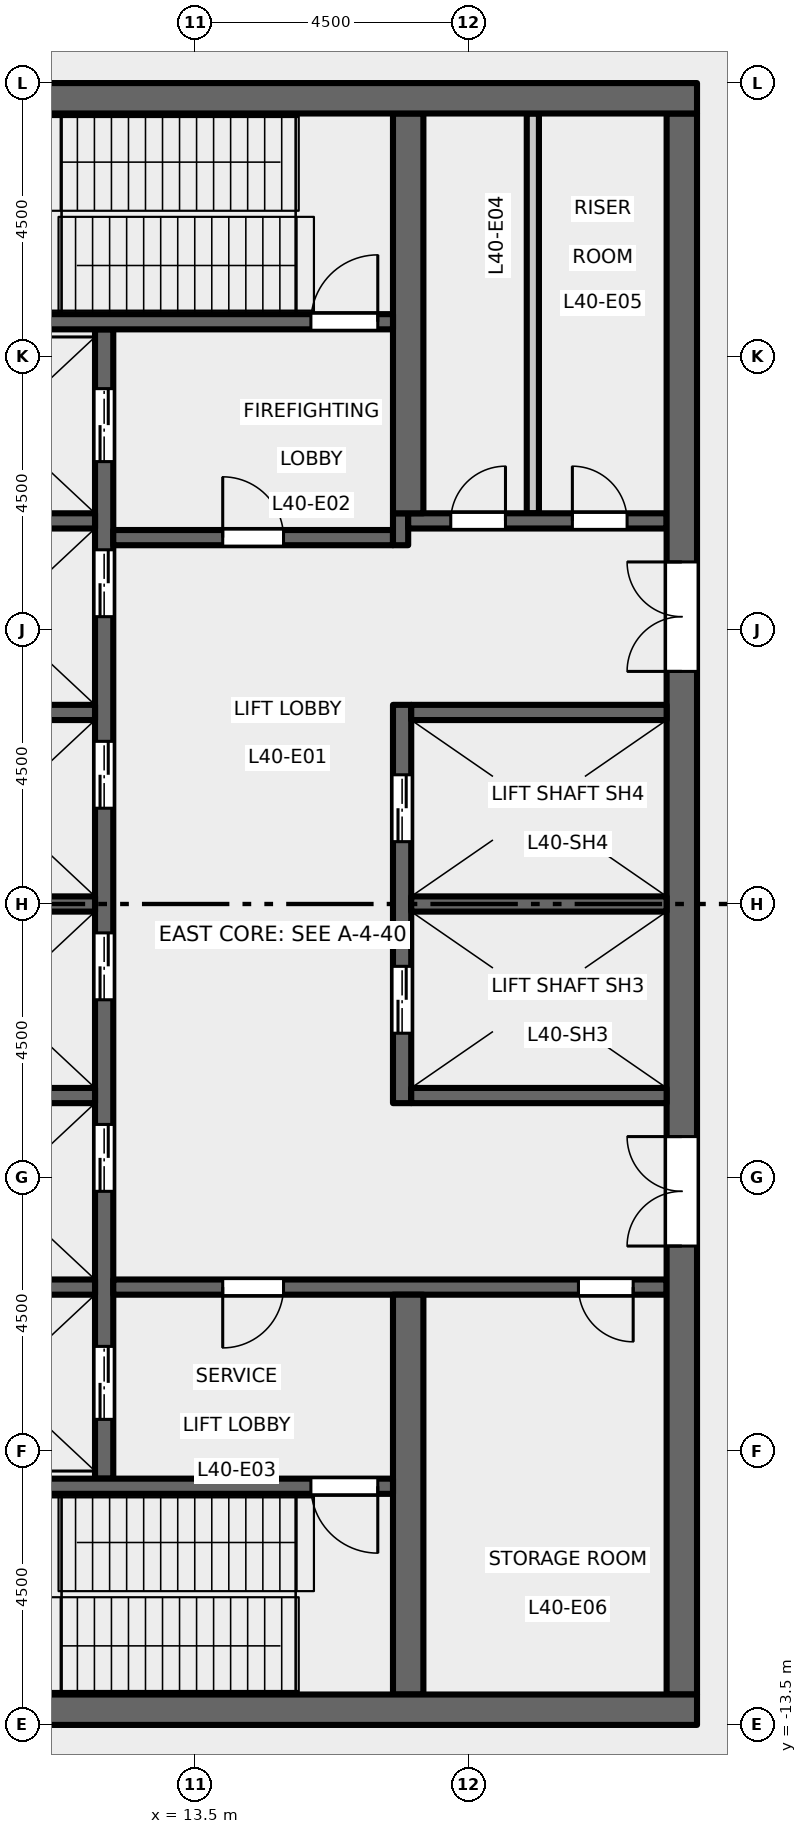
"""IFC4 building model, lengths in metres.
Left out: names, types, materials, properties, quantities, classifications, styles, units other than length and angle.
Written with IfcOpenShell. Run it as: python <this file> out.ifc"""

import sys

from ifc_helpers import new_model, si_unit, direction, frame, frame_2d, origin, place, context, subcontext, project, spatial, rectangle, extrude, element, fill, save


model = new_model("IFC4")
c1 = context("Model", 3, precision=1e-05, world=origin(), true_north=direction((0.0, 1.0)))
c2 = subcontext(c1, "Body", "Model", "MODEL_VIEW")
j1 = project(units=[si_unit("LENGTHUNIT", "METRE"), si_unit("PLANEANGLEUNIT", "RADIAN")], contexts=[c1])
p1 = place(None, origin())
s1 = spatial("IfcSite", under=j1, at=p1, CompositionType="ELEMENT")
p2 = place(p1, origin())
s2 = spatial("IfcBuilding", under=s1, at=p2, CompositionType="ELEMENT")
p3 = place(p2, frame((0.0, 0.0, 187.2)))
s3 = spatial("IfcBuildingStorey", under=s2, at=p3, CompositionType="ELEMENT", Elevation=187.2)
p4 = place(p3, frame((12.0, -9.45, 0.0), z_axis=(0.0, 0.0, 1.0), x_axis=(0.0, 1.0, 0.0)))
e1 = element("IfcWall", 1, at=p4, inside=s3, PredefinedType="SHEAR", context=c2, shape_type="SweptSolid", body=[
    extrude(rectangle(XDim=18.9, YDim=0.3, at=frame_2d((9.45, 0.0))), origin(), (0.0, 0.0, 1.0), 5.35),
])
p5 = place(p4, frame((4.725, 0.0, 0.0)))
e2 = element("IfcOpeningElement", 2, at=p5, cuts=e1, PredefinedType="OPENING", context=c2, shape_type="SweptSolid", body=[
    extrude(rectangle(XDim=1.1, YDim=2.1, at=frame_2d((0.55, 1.05))), frame((0.0, 0.16, 0.0), z_axis=(0.0, -1.0, 0.0), x_axis=(1.0, 0.0, 0.0)), (0.0, 0.0, 1.0), 0.32),
])
p6 = place(p4, frame((7.875, 0.0, 0.0)))
e3 = element("IfcOpeningElement", 3, at=p6, cuts=e1, PredefinedType="OPENING", context=c2, shape_type="SweptSolid", body=[
    extrude(rectangle(XDim=1.1, YDim=2.1, at=frame_2d((0.55, 1.05))), frame((0.0, 0.16, 0.0), z_axis=(0.0, -1.0, 0.0), x_axis=(1.0, 0.0, 0.0)), (0.0, 0.0, 1.0), 0.32),
])
p7 = place(p4, frame((11.025, 0.0, 0.0)))
e4 = element("IfcOpeningElement", 4, at=p7, cuts=e1, PredefinedType="OPENING", context=c2, shape_type="SweptSolid", body=[
    extrude(rectangle(XDim=1.1, YDim=2.1, at=frame_2d((0.55, 1.05))), frame((0.0, 0.16, 0.0), z_axis=(0.0, -1.0, 0.0), x_axis=(1.0, 0.0, 0.0)), (0.0, 0.0, 1.0), 0.32),
])
p8 = place(p4, frame((14.175, 0.0, 0.0)))
e5 = element("IfcOpeningElement", 5, at=p8, cuts=e1, PredefinedType="OPENING", context=c2, shape_type="SweptSolid", body=[
    extrude(rectangle(XDim=1.1, YDim=2.1, at=frame_2d((0.55, 1.05))), frame((0.0, 0.16, 0.0), z_axis=(0.0, -1.0, 0.0), x_axis=(1.0, 0.0, 0.0)), (0.0, 0.0, 1.0), 0.32),
])
p9 = place(p4, frame((16.725, 0.0, 0.0)))
e6 = element("IfcOpeningElement", 6, at=p9, cuts=e1, PredefinedType="OPENING", context=c2, shape_type="SweptSolid", body=[
    extrude(rectangle(XDim=1.2, YDim=2.1, at=frame_2d((0.6, 1.05))), frame((0.0, 0.16, 0.0), z_axis=(0.0, -1.0, 0.0), x_axis=(1.0, 0.0, 0.0)), (0.0, 0.0, 1.0), 0.32),
])
p10 = place(p4, frame((0.975, 0.0, 0.0)))
e7 = element("IfcOpeningElement", 7, at=p10, cuts=e1, PredefinedType="OPENING", context=c2, shape_type="SweptSolid", body=[
    extrude(rectangle(XDim=1.2, YDim=2.1, at=frame_2d((0.6, 1.05))), frame((0.0, 0.16, 0.0), z_axis=(0.0, -1.0, 0.0), x_axis=(1.0, 0.0, 0.0)), (0.0, 0.0, 1.0), 0.32),
])
p11 = place(p3, frame((12.15, 6.025, 0.0), z_axis=(0.0, 0.0, 1.0), x_axis=(1.0, 0.0, 0.0)))
e8 = element("IfcWall", 8, at=p11, inside=s3, PredefinedType="SHEAR", context=c2, shape_type="SweptSolid", body=[
    extrude(rectangle(XDim=4.6, YDim=0.25, at=frame_2d((2.3, 0.0))), origin(), (0.0, 0.0, 1.0), 5.35),
])
p12 = place(p11, frame((1.8, 0.0, 0.0)))
e9 = element("IfcOpeningElement", 9, at=p12, cuts=e8, PredefinedType="OPENING", context=c2, shape_type="SweptSolid", body=[
    extrude(rectangle(XDim=1.0, YDim=2.1, at=frame_2d((0.5, 1.05))), frame((0.0, 0.135, 0.0), z_axis=(0.0, -1.0, 0.0), x_axis=(1.0, 0.0, 0.0)), (0.0, 0.0, 1.0), 0.27),
])
p13 = place(p3, frame((16.875, 5.9, 0.0), z_axis=(0.0, 0.0, 1.0), x_axis=(0.0, 1.0, 0.0)))
e10 = element("IfcWall", 10, at=p13, inside=s3, PredefinedType="SHEAR", context=c2, shape_type="SweptSolid", body=[
    extrude(rectangle(XDim=0.525, YDim=0.25, at=frame_2d((0.263, 0.0))), origin(), (0.0, 0.0, 1.0), 5.35),
])
p14 = place(p3, frame((17.0, 6.3, 0.0), z_axis=(0.0, 0.0, 1.0), x_axis=(1.0, 0.0, 0.0)))
e11 = element("IfcWall", 11, at=p14, inside=s3, PredefinedType="SHEAR", context=c2, shape_type="SweptSolid", body=[
    extrude(rectangle(XDim=4.25, YDim=0.25, at=frame_2d((2.125, 0.0))), origin(), (0.0, 0.0, 1.0), 5.35),
])
p15 = place(p14, frame((0.7, 0.0, 0.0)))
e12 = element("IfcOpeningElement", 12, at=p15, cuts=e11, PredefinedType="OPENING", context=c2, shape_type="SweptSolid", body=[
    extrude(rectangle(XDim=0.9, YDim=2.1, at=frame_2d((0.45, 1.05))), frame((0.0, 0.135, 0.0), z_axis=(0.0, -1.0, 0.0), x_axis=(1.0, 0.0, 0.0)), (0.0, 0.0, 1.0), 0.27),
])
p16 = place(p14, frame((2.7, 0.0, 0.0)))
e13 = element("IfcOpeningElement", 13, at=p16, cuts=e11, PredefinedType="OPENING", context=c2, shape_type="SweptSolid", body=[
    extrude(rectangle(XDim=0.9, YDim=2.1, at=frame_2d((0.45, 1.05))), frame((0.0, 0.135, 0.0), z_axis=(0.0, -1.0, 0.0), x_axis=(1.0, 0.0, 0.0)), (0.0, 0.0, 1.0), 0.27),
])
p17 = place(p3, frame((12.15, -6.3, 0.0), z_axis=(0.0, 0.0, 1.0), x_axis=(1.0, 0.0, 0.0)))
e14 = element("IfcWall", 14, at=p17, inside=s3, PredefinedType="SHEAR", context=c2, shape_type="SweptSolid", body=[
    extrude(rectangle(XDim=9.1, YDim=0.25, at=frame_2d((4.55, 0.0))), origin(), (0.0, 0.0, 1.0), 5.35),
])
p18 = place(p17, frame((1.8, 0.0, 0.0)))
e15 = element("IfcOpeningElement", 15, at=p18, cuts=e14, PredefinedType="OPENING", context=c2, shape_type="SweptSolid", body=[
    extrude(rectangle(XDim=1.0, YDim=2.1, at=frame_2d((0.5, 1.05))), frame((0.0, 0.135, 0.0), z_axis=(0.0, -1.0, 0.0), x_axis=(1.0, 0.0, 0.0)), (0.0, 0.0, 1.0), 0.27),
])
p19 = place(p17, frame((7.65, 0.0, 0.0)))
e16 = element("IfcOpeningElement", 16, at=p19, cuts=e14, PredefinedType="OPENING", context=c2, shape_type="SweptSolid", body=[
    extrude(rectangle(XDim=0.9, YDim=2.1, at=frame_2d((0.45, 1.05))), frame((0.0, 0.135, 0.0), z_axis=(0.0, -1.0, 0.0), x_axis=(1.0, 0.0, 0.0)), (0.0, 0.0, 1.0), 0.27),
])
p20 = place(p3, frame((21.5, -13.0, 0.0), z_axis=(0.0, 0.0, 1.0), x_axis=(0.0, 1.0, 0.0)))
e17 = element("IfcWall", 17, at=p20, inside=s3, PredefinedType="SHEAR", context=c2, shape_type="SweptSolid", body=[
    extrude(rectangle(XDim=26.0, YDim=0.5, at=frame_2d((13.0, 0.0))), origin(), (0.0, 0.0, 1.0), 5.35),
])
p21 = place(p20, frame((16.825, 0.0, 0.0)))
e18 = element("IfcOpeningElement", 18, at=p21, cuts=e17, PredefinedType="OPENING", context=c2, shape_type="SweptSolid", body=[
    extrude(rectangle(XDim=1.8, YDim=2.1, at=frame_2d((0.9, 1.05))), frame((0.0, 0.26, 0.0), z_axis=(0.0, -1.0, 0.0), x_axis=(1.0, 0.0, 0.0)), (0.0, 0.0, 1.0), 0.52),
])
p22 = place(p20, frame((7.375, 0.0, 0.0)))
e19 = element("IfcOpeningElement", 19, at=p22, cuts=e17, PredefinedType="OPENING", context=c2, shape_type="SweptSolid", body=[
    extrude(rectangle(XDim=1.8, YDim=2.1, at=frame_2d((0.9, 1.05))), frame((0.0, 0.26, 0.0), z_axis=(0.0, -1.0, 0.0), x_axis=(1.0, 0.0, 0.0)), (0.0, 0.0, 1.0), 0.52),
])
p23 = place(p3, frame((19.05, 6.425, 0.0), z_axis=(0.0, 0.0, 1.0), x_axis=(0.0, 1.0, 0.0)))
e20 = element("IfcWall", 20, at=p23, inside=s3, PredefinedType="PARTITIONING", context=c2, shape_type="SweptSolid", body=[
    extrude(rectangle(XDim=6.575, YDim=0.2, at=frame_2d((3.288, 0.0))), origin(), (0.0, 0.0, 1.0), 5.35),
])
p24 = place(p3, frame((16.9, -3.275, 0.0), z_axis=(0.0, 0.0, 1.0), x_axis=(0.0, 1.0, 0.0)))
e21 = element("IfcWall", 21, at=p24, inside=s3, PredefinedType="SHEAR", context=c2, shape_type="SweptSolid", body=[
    extrude(rectangle(XDim=6.55, YDim=0.3, at=frame_2d((3.275, 0.0))), origin(), (0.0, 0.0, 1.0), 5.35),
])
p25 = place(p24, frame((1.15, 0.0, 0.0)))
e22 = element("IfcOpeningElement", 22, at=p25, cuts=e21, PredefinedType="OPENING", context=c2, shape_type="SweptSolid", body=[
    extrude(rectangle(XDim=1.1, YDim=2.1, at=frame_2d((0.55, 1.05))), frame((0.0, 0.16, 0.0), z_axis=(0.0, -1.0, 0.0), x_axis=(1.0, 0.0, 0.0)), (0.0, 0.0, 1.0), 0.32),
])
p26 = place(p24, frame((4.3, 0.0, 0.0)))
e23 = element("IfcOpeningElement", 23, at=p26, cuts=e21, PredefinedType="OPENING", context=c2, shape_type="SweptSolid", body=[
    extrude(rectangle(XDim=1.1, YDim=2.1, at=frame_2d((0.55, 1.05))), frame((0.0, 0.16, 0.0), z_axis=(0.0, -1.0, 0.0), x_axis=(1.0, 0.0, 0.0)), (0.0, 0.0, 1.0), 0.32),
])
for number, where, z_axis, x_axis in (
    (24, (17.05, 0.0, 0.0), (0.0, 0.0, 1.0), (1.0, 0.0, 0.0)),
    (25, (17.05, 3.15, 0.0), (0.0, 0.0, 1.0), (1.0, 0.0, 0.0)),
    (26, (17.05, -3.15, 0.0), (0.0, 0.0, 1.0), (1.0, 0.0, 0.0)),
):
    element("IfcWall", number, at=place(p3, frame(where, z_axis=z_axis, x_axis=x_axis)), inside=s3, PredefinedType="SHEAR", context=c2, shape_type="SweptSolid", body=[
        extrude(rectangle(XDim=4.2, YDim=0.25, at=frame_2d((2.1, 0.0))), origin(), (0.0, 0.0, 1.0), 5.35),
    ])
for number, where, z_axis, x_axis in (
    (27, (17.0, 6.425, 0.0), (0.0, 0.0, 1.0), (0.0, 1.0, 0.0)),
    (28, (17.0, -13.0, 0.0), (0.0, 0.0, 1.0), (0.0, 1.0, 0.0)),
):
    element("IfcWall", number, at=place(p3, frame(where, z_axis=z_axis, x_axis=x_axis)), inside=s3, PredefinedType="SHEAR", context=c2, shape_type="SweptSolid", body=[
        extrude(rectangle(XDim=6.575, YDim=0.5, at=frame_2d((3.288, 0.0))), origin(), (0.0, 0.0, 1.0), 5.35),
    ])
for number, where, z_axis, x_axis in (
    (29, (8.75, 0.0, 0.0), (0.0, 0.0, 1.0), (1.0, 0.0, 0.0)),
    (30, (8.75, 3.15, 0.0), (0.0, 0.0, 1.0), (1.0, 0.0, 0.0)),
    (31, (8.75, 6.3, 0.0), (0.0, 0.0, 1.0), (1.0, 0.0, 0.0)),
    (32, (8.75, -3.15, 0.0), (0.0, 0.0, 1.0), (1.0, 0.0, 0.0)),
    (33, (8.75, -6.3, 0.0), (0.0, 0.0, 1.0), (1.0, 0.0, 0.0)),
):
    element("IfcWall", number, at=place(p3, frame(where, z_axis=z_axis, x_axis=x_axis)), inside=s3, PredefinedType="SHEAR", context=c2, shape_type="SweptSolid", body=[
        extrude(rectangle(XDim=3.1, YDim=0.25, at=frame_2d((1.55, 0.0))), origin(), (0.0, 0.0, 1.0), 5.35),
    ])
p27 = place(p3, frame((8.75, 9.575, 0.0), z_axis=(0.0, 0.0, 1.0), x_axis=(1.0, 0.0, 0.0)))
e34 = element("IfcWall", 34, at=p27, inside=s3, PredefinedType="SHEAR", context=c2, shape_type="SweptSolid", body=[
    extrude(rectangle(XDim=8.0, YDim=0.25, at=frame_2d((4.0, 0.0))), origin(), (0.0, 0.0, 1.0), 5.35),
])
p28 = place(p27, frame((6.65, 0.0, 0.0)))
e35 = element("IfcOpeningElement", 35, at=p28, cuts=e34, PredefinedType="OPENING", context=c2, shape_type="SweptSolid", body=[
    extrude(rectangle(XDim=1.1, YDim=2.1, at=frame_2d((0.55, 1.05))), frame((0.0, 0.135, 0.0), z_axis=(0.0, -1.0, 0.0), x_axis=(1.0, 0.0, 0.0)), (0.0, 0.0, 1.0), 0.27),
])
p29 = place(p3, frame((8.75, -9.575, 0.0), z_axis=(0.0, 0.0, 1.0), x_axis=(1.0, 0.0, 0.0)))
e36 = element("IfcWall", 36, at=p29, inside=s3, PredefinedType="SHEAR", context=c2, shape_type="SweptSolid", body=[
    extrude(rectangle(XDim=8.0, YDim=0.25, at=frame_2d((4.0, 0.0))), origin(), (0.0, 0.0, 1.0), 5.35),
])
p30 = place(p29, frame((6.65, 0.0, 0.0)))
e37 = element("IfcOpeningElement", 37, at=p30, cuts=e36, PredefinedType="OPENING", context=c2, shape_type="SweptSolid", body=[
    extrude(rectangle(XDim=1.1, YDim=2.1, at=frame_2d((0.55, 1.05))), frame((0.0, 0.135, 0.0), z_axis=(0.0, -1.0, 0.0), x_axis=(1.0, 0.0, 0.0)), (0.0, 0.0, 1.0), 0.27),
])
for number, where, z_axis, x_axis in (
    (38, (8.25, 13.25, 0.0), (0.0, 0.0, 1.0), (1.0, 0.0, 0.0)),
    (39, (8.25, -13.25, 0.0), (0.0, 0.0, 1.0), (1.0, 0.0, 0.0)),
):
    element("IfcWall", number, at=place(p3, frame(where, z_axis=z_axis, x_axis=x_axis)), inside=s3, PredefinedType="SHEAR", context=c2, shape_type="SweptSolid", body=[
        extrude(rectangle(XDim=13.5, YDim=0.5, at=frame_2d((6.75, 0.0))), origin(), (0.0, 0.0, 1.0), 5.35),
    ])
p31 = place(p12, origin())
e40 = element("IfcDoor", 40, at=p31, inside=s3, OperationType="SINGLE_SWING_RIGHT", PredefinedType="DOOR", context=c2, shape_type="SweptSolid", body=[
    extrude(rectangle(XDim=1.0, YDim=2.1, at=frame_2d((0.5, 1.05))), frame((0.0, 0.025, 0.0), z_axis=(0.0, -1.0, 0.0), x_axis=(1.0, 0.0, 0.0)), (0.0, 0.0, 1.0), 0.05),
])
fill(e9, e40)
p32 = place(p18, origin())
e41 = element("IfcDoor", 41, at=p32, inside=s3, OperationType="SINGLE_SWING_LEFT", PredefinedType="DOOR", context=c2, shape_type="SweptSolid", body=[
    extrude(rectangle(XDim=1.0, YDim=2.1, at=frame_2d((0.5, 1.05))), frame((0.0, 0.025, 0.0), z_axis=(0.0, -1.0, 0.0), x_axis=(1.0, 0.0, 0.0)), (0.0, 0.0, 1.0), 0.05),
])
fill(e15, e41)
p33 = place(p28, origin())
e42 = element("IfcDoor", 42, at=p33, inside=s3, OperationType="SINGLE_SWING_LEFT", PredefinedType="DOOR", context=c2, shape_type="SweptSolid", body=[
    extrude(rectangle(XDim=1.1, YDim=2.1, at=frame_2d((0.55, 1.05))), frame((0.0, 0.025, 0.0), z_axis=(0.0, -1.0, 0.0), x_axis=(1.0, 0.0, 0.0)), (0.0, 0.0, 1.0), 0.05),
])
fill(e35, e42)
p34 = place(p30, origin())
e43 = element("IfcDoor", 43, at=p34, inside=s3, OperationType="SINGLE_SWING_RIGHT", PredefinedType="DOOR", context=c2, shape_type="SweptSolid", body=[
    extrude(rectangle(XDim=1.1, YDim=2.1, at=frame_2d((0.55, 1.05))), frame((0.0, 0.025, 0.0), z_axis=(0.0, -1.0, 0.0), x_axis=(1.0, 0.0, 0.0)), (0.0, 0.0, 1.0), 0.05),
])
fill(e37, e43)
p35 = place(p21, origin())
e44 = element("IfcDoor", 44, at=p35, inside=s3, OperationType="DOUBLE_DOOR_DOUBLE_SWING", PredefinedType="DOOR", context=c2, shape_type="SweptSolid", body=[
    extrude(rectangle(XDim=1.8, YDim=2.1, at=frame_2d((0.9, 1.05))), frame((0.0, 0.025, 0.0), z_axis=(0.0, -1.0, 0.0), x_axis=(1.0, 0.0, 0.0)), (0.0, 0.0, 1.0), 0.05),
])
fill(e18, e44)
p36 = place(p22, origin())
e45 = element("IfcDoor", 45, at=p36, inside=s3, OperationType="DOUBLE_DOOR_DOUBLE_SWING", PredefinedType="DOOR", context=c2, shape_type="SweptSolid", body=[
    extrude(rectangle(XDim=1.8, YDim=2.1, at=frame_2d((0.9, 1.05))), frame((0.0, 0.025, 0.0), z_axis=(0.0, -1.0, 0.0), x_axis=(1.0, 0.0, 0.0)), (0.0, 0.0, 1.0), 0.05),
])
fill(e19, e45)
p37 = place(p5, origin())
e46 = element("IfcDoor", 46, at=p37, inside=s3, OperationType="DOUBLE_DOOR_SLIDING", PredefinedType="DOOR", context=c2, shape_type="SweptSolid", body=[
    extrude(rectangle(XDim=1.1, YDim=2.1, at=frame_2d((0.55, 1.05))), frame((0.0, 0.025, 0.0), z_axis=(0.0, -1.0, 0.0), x_axis=(1.0, 0.0, 0.0)), (0.0, 0.0, 1.0), 0.05),
])
fill(e2, e46)
p38 = place(p6, origin())
e47 = element("IfcDoor", 47, at=p38, inside=s3, OperationType="DOUBLE_DOOR_SLIDING", PredefinedType="DOOR", context=c2, shape_type="SweptSolid", body=[
    extrude(rectangle(XDim=1.1, YDim=2.1, at=frame_2d((0.55, 1.05))), frame((0.0, 0.025, 0.0), z_axis=(0.0, -1.0, 0.0), x_axis=(1.0, 0.0, 0.0)), (0.0, 0.0, 1.0), 0.05),
])
fill(e3, e47)
p39 = place(p7, origin())
e48 = element("IfcDoor", 48, at=p39, inside=s3, OperationType="DOUBLE_DOOR_SLIDING", PredefinedType="DOOR", context=c2, shape_type="SweptSolid", body=[
    extrude(rectangle(XDim=1.1, YDim=2.1, at=frame_2d((0.55, 1.05))), frame((0.0, 0.025, 0.0), z_axis=(0.0, -1.0, 0.0), x_axis=(1.0, 0.0, 0.0)), (0.0, 0.0, 1.0), 0.05),
])
fill(e4, e48)
p40 = place(p8, origin())
e49 = element("IfcDoor", 49, at=p40, inside=s3, OperationType="DOUBLE_DOOR_SLIDING", PredefinedType="DOOR", context=c2, shape_type="SweptSolid", body=[
    extrude(rectangle(XDim=1.1, YDim=2.1, at=frame_2d((0.55, 1.05))), frame((0.0, 0.025, 0.0), z_axis=(0.0, -1.0, 0.0), x_axis=(1.0, 0.0, 0.0)), (0.0, 0.0, 1.0), 0.05),
])
fill(e5, e49)
p41 = place(p25, origin())
e50 = element("IfcDoor", 50, at=p41, inside=s3, OperationType="DOUBLE_DOOR_SLIDING", PredefinedType="DOOR", context=c2, shape_type="SweptSolid", body=[
    extrude(rectangle(XDim=1.1, YDim=2.1, at=frame_2d((0.55, 1.05))), frame((0.0, 0.025, 0.0), z_axis=(0.0, -1.0, 0.0), x_axis=(1.0, 0.0, 0.0)), (0.0, 0.0, 1.0), 0.05),
])
fill(e22, e50)
p42 = place(p26, origin())
e51 = element("IfcDoor", 51, at=p42, inside=s3, OperationType="DOUBLE_DOOR_SLIDING", PredefinedType="DOOR", context=c2, shape_type="SweptSolid", body=[
    extrude(rectangle(XDim=1.1, YDim=2.1, at=frame_2d((0.55, 1.05))), frame((0.0, 0.025, 0.0), z_axis=(0.0, -1.0, 0.0), x_axis=(1.0, 0.0, 0.0)), (0.0, 0.0, 1.0), 0.05),
])
fill(e23, e51)
p43 = place(p9, origin())
e52 = element("IfcDoor", 52, at=p43, inside=s3, OperationType="DOUBLE_DOOR_SLIDING", PredefinedType="DOOR", context=c2, shape_type="SweptSolid", body=[
    extrude(rectangle(XDim=1.2, YDim=2.1, at=frame_2d((0.6, 1.05))), frame((0.0, 0.025, 0.0), z_axis=(0.0, -1.0, 0.0), x_axis=(1.0, 0.0, 0.0)), (0.0, 0.0, 1.0), 0.05),
])
fill(e6, e52)
p44 = place(p10, origin())
e53 = element("IfcDoor", 53, at=p44, inside=s3, OperationType="DOUBLE_DOOR_SLIDING", PredefinedType="DOOR", context=c2, shape_type="SweptSolid", body=[
    extrude(rectangle(XDim=1.2, YDim=2.1, at=frame_2d((0.6, 1.05))), frame((0.0, 0.025, 0.0), z_axis=(0.0, -1.0, 0.0), x_axis=(1.0, 0.0, 0.0)), (0.0, 0.0, 1.0), 0.05),
])
fill(e7, e53)
p45 = place(p15, origin())
e54 = element("IfcDoor", 54, at=p45, inside=s3, OperationType="SINGLE_SWING_LEFT", PredefinedType="DOOR", context=c2, shape_type="SweptSolid", body=[
    extrude(rectangle(XDim=0.9, YDim=2.1, at=frame_2d((0.45, 1.05))), frame((0.0, 0.025, 0.0), z_axis=(0.0, -1.0, 0.0), x_axis=(1.0, 0.0, 0.0)), (0.0, 0.0, 1.0), 0.05),
])
fill(e12, e54)
p46 = place(p16, origin())
e55 = element("IfcDoor", 55, at=p46, inside=s3, OperationType="SINGLE_SWING_RIGHT", PredefinedType="DOOR", context=c2, shape_type="SweptSolid", body=[
    extrude(rectangle(XDim=0.9, YDim=2.1, at=frame_2d((0.45, 1.05))), frame((0.0, 0.025, 0.0), z_axis=(0.0, -1.0, 0.0), x_axis=(1.0, 0.0, 0.0)), (0.0, 0.0, 1.0), 0.05),
])
fill(e13, e55)
p47 = place(p19, origin())
e56 = element("IfcDoor", 56, at=p47, inside=s3, OperationType="SINGLE_SWING_RIGHT", PredefinedType="DOOR", context=c2, shape_type="SweptSolid", body=[
    extrude(rectangle(XDim=0.9, YDim=2.1, at=frame_2d((0.45, 1.05))), frame((0.0, 0.025, 0.0), z_axis=(0.0, -1.0, 0.0), x_axis=(1.0, 0.0, 0.0)), (0.0, 0.0, 1.0), 0.05),
])
fill(e16, e56)
save(model, sys.argv[1])
